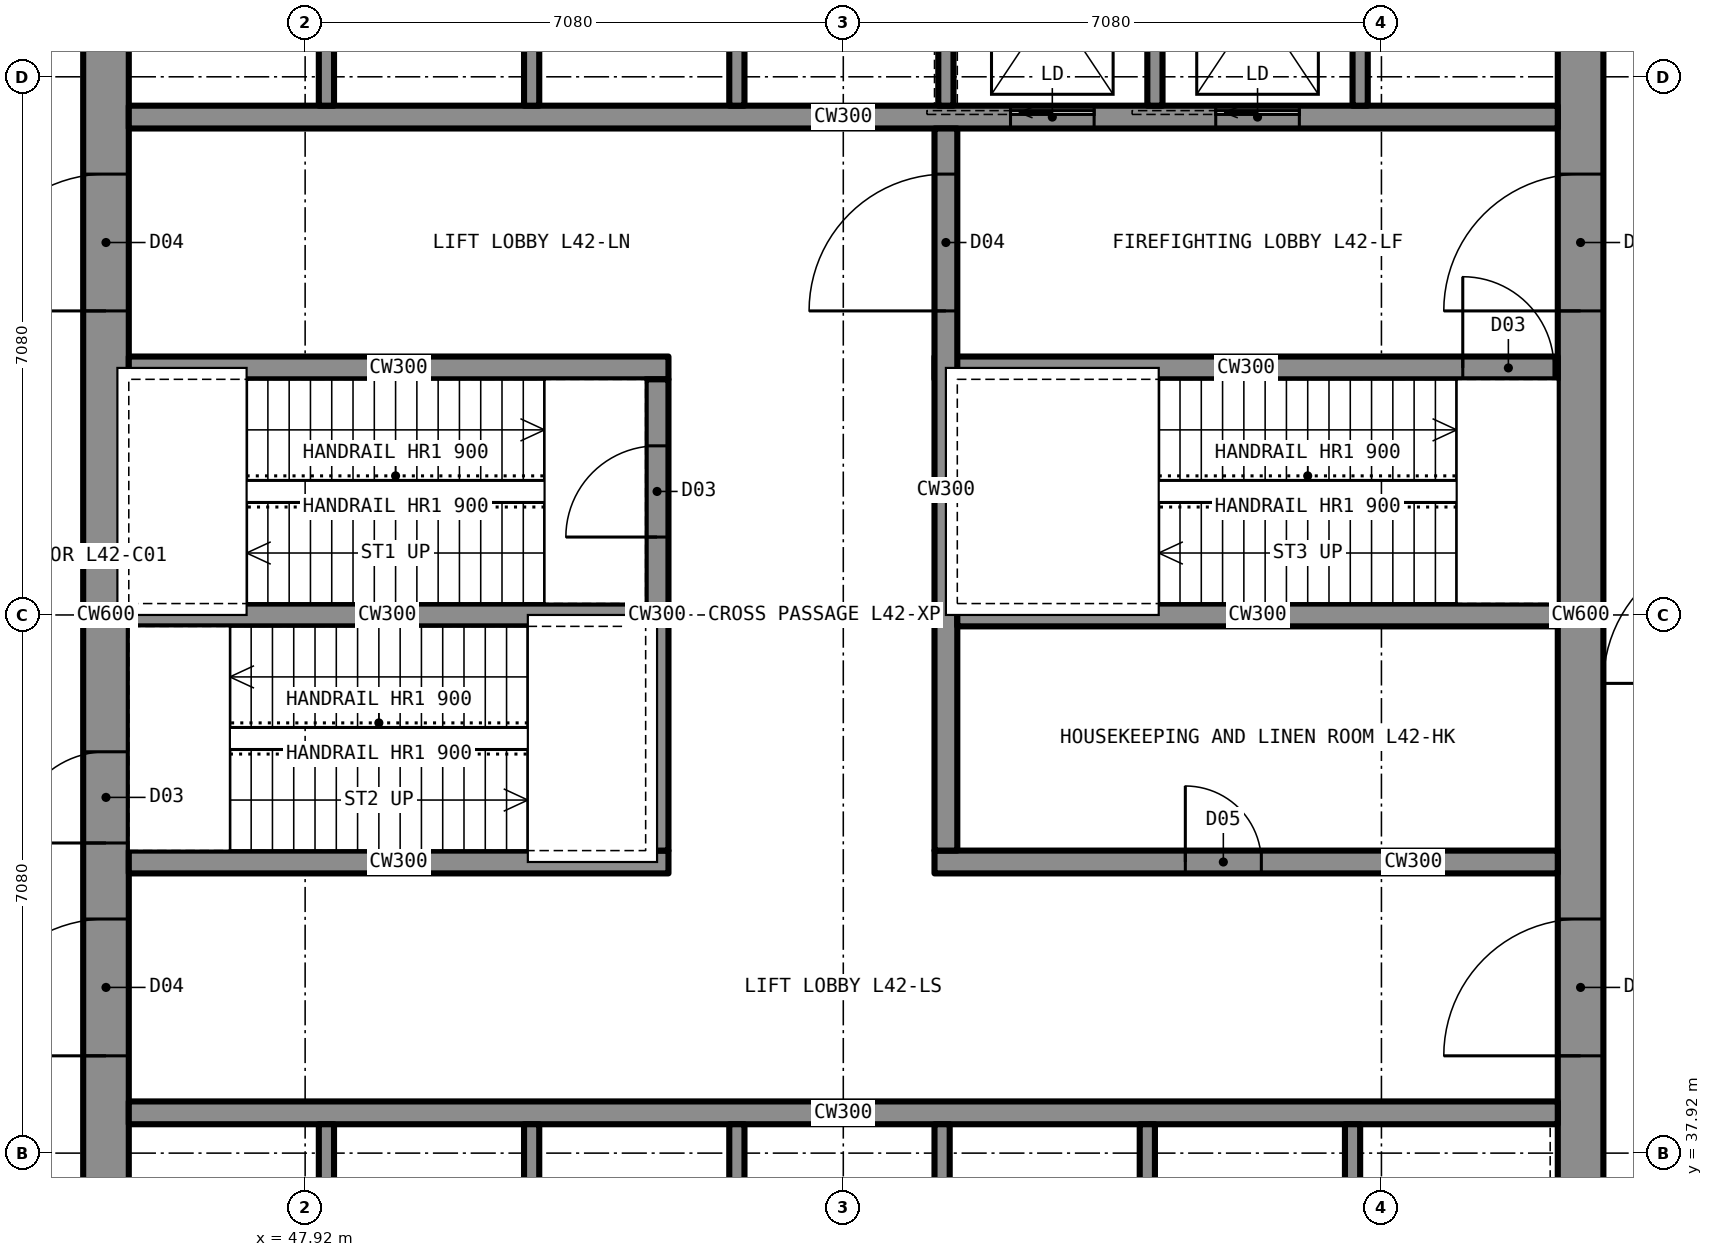
"""IFC4 building model, lengths in metres.
Left out: names, types, materials, properties, quantities, classifications, styles, units other than length and angle.
Written with IfcOpenShell. Run it as: python <this file> out.ifc"""

import sys

from ifc_helpers import new_model, si_unit, direction, frame, frame_2d, origin, place, context, subcontext, project, spatial, rectangle, extrude, element, fill, save


model = new_model("IFC4")
c1 = context("Model", 3, precision=1e-05, world=origin(), true_north=direction((0.0, 1.0)))
c2 = subcontext(c1, "Body", "Model", "MODEL_VIEW")
j1 = project(units=[si_unit("LENGTHUNIT", "METRE"), si_unit("PLANEANGLEUNIT", "RADIAN")], contexts=[c1])
p1 = place(None, origin())
s1 = spatial("IfcSite", under=j1, at=p1, CompositionType="ELEMENT")
p2 = place(p1, origin())
s2 = spatial("IfcBuilding", under=s1, at=p2, CompositionType="ELEMENT")
p3 = place(p2, frame((0.0, 0.0, 156.4)))
s3 = spatial("IfcBuildingStorey", under=s2, at=p3, CompositionType="ELEMENT", Elevation=156.4)
p4 = place(p3, frame((64.7, 35.6, 0.0), z_axis=(0.0, 0.0, 1.0), x_axis=(0.0, 1.0, 0.0)))
e1 = element("IfcWall", 1, at=p4, inside=s3, PredefinedType="SHEAR", context=c2, shape_type="SweptSolid", body=[
    extrude(rectangle(XDim=18.8, YDim=0.6, at=frame_2d((9.4, 0.0))), origin(), (0.0, 0.0, 1.0), 5.4),
])
p5 = place(p4, frame((13.4, 0.0, 0.0)))
e2 = element("IfcOpeningElement", 2, at=p5, cuts=e1, PredefinedType="OPENING", context=c2, shape_type="SweptSolid", body=[
    extrude(rectangle(XDim=1.8, YDim=2.2, at=frame_2d((0.9, 1.1))), frame((0.0, 0.31, 0.0), z_axis=(0.0, -1.0, 0.0), x_axis=(1.0, 0.0, 0.0)), (0.0, 0.0, 1.0), 0.62),
])
p6 = place(p4, frame((3.6, 0.0, 0.0)))
e3 = element("IfcOpeningElement", 3, at=p6, cuts=e1, PredefinedType="OPENING", context=c2, shape_type="SweptSolid", body=[
    extrude(rectangle(XDim=1.8, YDim=2.2, at=frame_2d((0.9, 1.1))), frame((0.0, 0.31, 0.0), z_axis=(0.0, -1.0, 0.0), x_axis=(1.0, 0.0, 0.0)), (0.0, 0.0, 1.0), 0.62),
])
p7 = place(p3, frame((45.3, 35.6, 0.0), z_axis=(0.0, 0.0, 1.0), x_axis=(0.0, 1.0, 0.0)))
e4 = element("IfcWall", 4, at=p7, inside=s3, PredefinedType="SHEAR", context=c2, shape_type="SweptSolid", body=[
    extrude(rectangle(XDim=18.8, YDim=0.6, at=frame_2d((9.4, 0.0))), origin(), (0.0, 0.0, 1.0), 5.4),
])
p8 = place(p7, frame((13.4, 0.0, 0.0)))
e5 = element("IfcOpeningElement", 5, at=p8, cuts=e4, PredefinedType="OPENING", context=c2, shape_type="SweptSolid", body=[
    extrude(rectangle(XDim=1.8, YDim=2.2, at=frame_2d((0.9, 1.1))), frame((0.0, 0.31, 0.0), z_axis=(0.0, -1.0, 0.0), x_axis=(1.0, 0.0, 0.0)), (0.0, 0.0, 1.0), 0.62),
])
p9 = place(p7, frame((3.6, 0.0, 0.0)))
e6 = element("IfcOpeningElement", 6, at=p9, cuts=e4, PredefinedType="OPENING", context=c2, shape_type="SweptSolid", body=[
    extrude(rectangle(XDim=1.8, YDim=2.2, at=frame_2d((0.9, 1.1))), frame((0.0, 0.31, 0.0), z_axis=(0.0, -1.0, 0.0), x_axis=(1.0, 0.0, 0.0)), (0.0, 0.0, 1.0), 0.62),
])
p10 = place(p7, frame((6.4, 0.0, 0.0)))
e7 = element("IfcOpeningElement", 7, at=p10, cuts=e4, PredefinedType="OPENING", context=c2, shape_type="SweptSolid", body=[
    extrude(rectangle(XDim=1.2, YDim=2.2, at=frame_2d((0.6, 1.1))), frame((0.0, 0.31, 0.0), z_axis=(0.0, -1.0, 0.0), x_axis=(1.0, 0.0, 0.0)), (0.0, 0.0, 1.0), 0.62),
])
p11 = place(p3, frame((45.6, 51.55, 0.0), z_axis=(0.0, 0.0, 1.0), x_axis=(1.0, 0.0, 0.0)))
e8 = element("IfcWall", 8, at=p11, inside=s3, PredefinedType="SHEAR", context=c2, shape_type="SweptSolid", body=[
    extrude(rectangle(XDim=18.8, YDim=0.3, at=frame_2d((9.4, 0.0))), origin(), (0.0, 0.0, 1.0), 5.4),
])
p12 = place(p11, frame((11.6, 0.0, 0.0)))
e9 = element("IfcOpeningElement", 9, at=p12, cuts=e8, PredefinedType="OPENING", context=c2, shape_type="SweptSolid", body=[
    extrude(rectangle(XDim=1.1, YDim=2.2, at=frame_2d((0.55, 1.1))), frame((0.0, 0.16, 0.0), z_axis=(0.0, -1.0, 0.0), x_axis=(1.0, 0.0, 0.0)), (0.0, 0.0, 1.0), 0.32),
])
p13 = place(p11, frame((14.3, 0.0, 0.0)))
e10 = element("IfcOpeningElement", 10, at=p13, cuts=e8, PredefinedType="OPENING", context=c2, shape_type="SweptSolid", body=[
    extrude(rectangle(XDim=1.1, YDim=2.2, at=frame_2d((0.55, 1.1))), frame((0.0, 0.16, 0.0), z_axis=(0.0, -1.0, 0.0), x_axis=(1.0, 0.0, 0.0)), (0.0, 0.0, 1.0), 0.32),
])
p14 = place(p3, frame((45.6, 38.45, 0.0), z_axis=(0.0, 0.0, 1.0), x_axis=(1.0, 0.0, 0.0)))
e11 = element("IfcWall", 11, at=p14, inside=s3, PredefinedType="SHEAR", context=c2, shape_type="SweptSolid", body=[
    extrude(rectangle(XDim=18.8, YDim=0.3, at=frame_2d((9.4, 0.0))), origin(), (0.0, 0.0, 1.0), 5.4),
])
p15 = place(p3, frame((45.6, 48.25, 0.0), z_axis=(0.0, 0.0, 1.0), x_axis=(1.0, 0.0, 0.0)))
e12 = element("IfcWall", 12, at=p15, inside=s3, PredefinedType="SHEAR", context=c2, shape_type="SweptSolid", body=[
    extrude(rectangle(XDim=7.1, YDim=0.3, at=frame_2d((3.55, 0.0))), origin(), (0.0, 0.0, 1.0), 5.4),
])
p16 = place(p3, frame((56.2, 48.25, 0.0), z_axis=(0.0, 0.0, 1.0), x_axis=(1.0, 0.0, 0.0)))
e13 = element("IfcWall", 13, at=p16, inside=s3, PredefinedType="SHEAR", context=c2, shape_type="SweptSolid", body=[
    extrude(rectangle(XDim=8.2, YDim=0.3, at=frame_2d((4.1, 0.0))), origin(), (0.0, 0.0, 1.0), 5.4),
])
p17 = place(p16, frame((6.95, 0.0, 0.0)))
e14 = element("IfcOpeningElement", 14, at=p17, cuts=e13, PredefinedType="OPENING", context=c2, shape_type="SweptSolid", body=[
    extrude(rectangle(XDim=1.2, YDim=2.2, at=frame_2d((0.6, 1.1))), frame((0.0, 0.16, 0.0), z_axis=(0.0, -1.0, 0.0), x_axis=(1.0, 0.0, 0.0)), (0.0, 0.0, 1.0), 0.32),
])
p18 = place(p3, frame((45.6, 41.75, 0.0), z_axis=(0.0, 0.0, 1.0), x_axis=(1.0, 0.0, 0.0)))
e15 = element("IfcWall", 15, at=p18, inside=s3, PredefinedType="SHEAR", context=c2, shape_type="SweptSolid", body=[
    extrude(rectangle(XDim=7.1, YDim=0.3, at=frame_2d((3.55, 0.0))), origin(), (0.0, 0.0, 1.0), 5.4),
])
p19 = place(p3, frame((56.2, 41.75, 0.0), z_axis=(0.0, 0.0, 1.0), x_axis=(1.0, 0.0, 0.0)))
e16 = element("IfcWall", 16, at=p19, inside=s3, PredefinedType="SHEAR", context=c2, shape_type="SweptSolid", body=[
    extrude(rectangle(XDim=8.2, YDim=0.3, at=frame_2d((4.1, 0.0))), origin(), (0.0, 0.0, 1.0), 5.4),
])
p20 = place(p19, frame((3.3, 0.0, 0.0)))
e17 = element("IfcOpeningElement", 17, at=p20, cuts=e16, PredefinedType="OPENING", context=c2, shape_type="SweptSolid", body=[
    extrude(rectangle(XDim=1.0, YDim=2.1, at=frame_2d((0.5, 1.05))), frame((0.0, 0.16, 0.0), z_axis=(0.0, -1.0, 0.0), x_axis=(1.0, 0.0, 0.0)), (0.0, 0.0, 1.0), 0.32),
])
p21 = place(p3, frame((52.55, 41.9, 0.0), z_axis=(0.0, 0.0, 1.0), x_axis=(0.0, 1.0, 0.0)))
e18 = element("IfcWall", 18, at=p21, inside=s3, PredefinedType="SHEAR", context=c2, shape_type="SweptSolid", body=[
    extrude(rectangle(XDim=6.2, YDim=0.3, at=frame_2d((3.1, 0.0))), origin(), (0.0, 0.0, 1.0), 5.4),
])
p22 = place(p21, frame((4.125, 0.0, 0.0)))
e19 = element("IfcOpeningElement", 19, at=p22, cuts=e18, PredefinedType="OPENING", context=c2, shape_type="SweptSolid", body=[
    extrude(rectangle(XDim=1.2, YDim=2.2, at=frame_2d((0.6, 1.1))), frame((0.0, 0.16, 0.0), z_axis=(0.0, -1.0, 0.0), x_axis=(1.0, 0.0, 0.0)), (0.0, 0.0, 1.0), 0.32),
])
p23 = place(p3, frame((56.35, 41.9, 0.0), z_axis=(0.0, 0.0, 1.0), x_axis=(0.0, 1.0, 0.0)))
e20 = element("IfcWall", 20, at=p23, inside=s3, PredefinedType="SHEAR", context=c2, shape_type="SweptSolid", body=[
    extrude(rectangle(XDim=9.5, YDim=0.3, at=frame_2d((4.75, 0.0))), origin(), (0.0, 0.0, 1.0), 5.4),
])
p24 = place(p23, frame((7.1, 0.0, 0.0)))
e21 = element("IfcOpeningElement", 21, at=p24, cuts=e20, PredefinedType="OPENING", context=c2, shape_type="SweptSolid", body=[
    extrude(rectangle(XDim=1.8, YDim=2.2, at=frame_2d((0.9, 1.1))), frame((0.0, 0.16, 0.0), z_axis=(0.0, -1.0, 0.0), x_axis=(1.0, 0.0, 0.0)), (0.0, 0.0, 1.0), 0.32),
])
p25 = place(p3, frame((45.6, 45.0, 0.0), z_axis=(0.0, 0.0, 1.0), x_axis=(1.0, 0.0, 0.0)))
e22 = element("IfcWall", 22, at=p25, inside=s3, PredefinedType="SHEAR", context=c2, shape_type="SweptSolid", body=[
    extrude(rectangle(XDim=6.8, YDim=0.3, at=frame_2d((3.4, 0.0))), origin(), (0.0, 0.0, 1.0), 5.4),
])
p26 = place(p3, frame((56.5, 45.0, 0.0), z_axis=(0.0, 0.0, 1.0), x_axis=(1.0, 0.0, 0.0)))
e23 = element("IfcWall", 23, at=p26, inside=s3, PredefinedType="SHEAR", context=c2, shape_type="SweptSolid", body=[
    extrude(rectangle(XDim=7.9, YDim=0.3, at=frame_2d((3.95, 0.0))), origin(), (0.0, 0.0, 1.0), 5.4),
])
for number, where, z_axis, x_axis in (
    (24, (48.2, 51.7, 0.0), (0.0, 0.0, 1.0), (0.0, 1.0, 0.0)),
    (25, (50.9, 51.7, 0.0), (0.0, 0.0, 1.0), (0.0, 1.0, 0.0)),
    (26, (53.6, 51.7, 0.0), (0.0, 0.0, 1.0), (0.0, 1.0, 0.0)),
    (27, (59.1, 51.7, 0.0), (0.0, 0.0, 1.0), (0.0, 1.0, 0.0)),
    (28, (61.8, 51.7, 0.0), (0.0, 0.0, 1.0), (0.0, 1.0, 0.0)),
    (29, (56.35, 51.7, 0.0), (0.0, 0.0, 1.0), (0.0, 1.0, 0.0)),
    (30, (48.2, 35.6, 0.0), (0.0, 0.0, 1.0), (0.0, 1.0, 0.0)),
    (31, (50.9, 35.6, 0.0), (0.0, 0.0, 1.0), (0.0, 1.0, 0.0)),
    (32, (53.6, 35.6, 0.0), (0.0, 0.0, 1.0), (0.0, 1.0, 0.0)),
    (33, (56.3, 35.6, 0.0), (0.0, 0.0, 1.0), (0.0, 1.0, 0.0)),
    (34, (59.0, 35.6, 0.0), (0.0, 0.0, 1.0), (0.0, 1.0, 0.0)),
    (35, (61.7, 35.6, 0.0), (0.0, 0.0, 1.0), (0.0, 1.0, 0.0)),
):
    element("IfcWall", number, at=place(p3, frame(where, z_axis=z_axis, x_axis=x_axis)), inside=s3, PredefinedType="PARTITIONING", context=c2, shape_type="SweptSolid", body=[
        extrude(rectangle(XDim=2.7, YDim=0.2, at=frame_2d((1.35, 0.0))), origin(), (0.0, 0.0, 1.0), 5.23),
    ])
p27 = place(p8, origin())
e36 = element("IfcDoor", 36, at=p27, inside=s3, OperationType="DOUBLE_DOOR_SINGLE_SWING", PredefinedType="DOOR", context=c2, shape_type="SweptSolid", body=[
    extrude(rectangle(XDim=1.8, YDim=2.2, at=frame_2d((0.9, 1.1))), frame((0.0, 0.025, 0.0), z_axis=(0.0, -1.0, 0.0), x_axis=(1.0, 0.0, 0.0)), (0.0, 0.0, 1.0), 0.05),
])
fill(e5, e36)
p28 = place(p9, origin())
e37 = element("IfcDoor", 37, at=p28, inside=s3, OperationType="DOUBLE_DOOR_SINGLE_SWING", PredefinedType="DOOR", context=c2, shape_type="SweptSolid", body=[
    extrude(rectangle(XDim=1.8, YDim=2.2, at=frame_2d((0.9, 1.1))), frame((0.0, 0.025, 0.0), z_axis=(0.0, -1.0, 0.0), x_axis=(1.0, 0.0, 0.0)), (0.0, 0.0, 1.0), 0.05),
])
fill(e6, e37)
p29 = place(p5, origin())
e38 = element("IfcDoor", 38, at=p29, inside=s3, OperationType="DOUBLE_DOOR_SINGLE_SWING", PredefinedType="DOOR", context=c2, shape_type="SweptSolid", body=[
    extrude(rectangle(XDim=1.8, YDim=2.2, at=frame_2d((0.9, 1.1))), frame((0.0, 0.025, 0.0), z_axis=(0.0, -1.0, 0.0), x_axis=(1.0, 0.0, 0.0)), (0.0, 0.0, 1.0), 0.05),
])
fill(e2, e38)
p30 = place(p6, origin())
e39 = element("IfcDoor", 39, at=p30, inside=s3, OperationType="DOUBLE_DOOR_SINGLE_SWING", PredefinedType="DOOR", context=c2, shape_type="SweptSolid", body=[
    extrude(rectangle(XDim=1.8, YDim=2.2, at=frame_2d((0.9, 1.1))), frame((0.0, 0.025, 0.0), z_axis=(0.0, -1.0, 0.0), x_axis=(1.0, 0.0, 0.0)), (0.0, 0.0, 1.0), 0.05),
])
fill(e3, e39)
p31 = place(p24, origin())
e40 = element("IfcDoor", 40, at=p31, inside=s3, OperationType="DOUBLE_DOOR_SINGLE_SWING", PredefinedType="DOOR", context=c2, shape_type="SweptSolid", body=[
    extrude(rectangle(XDim=1.8, YDim=2.2, at=frame_2d((0.9, 1.1))), frame((0.0, 0.025, 0.0), z_axis=(0.0, -1.0, 0.0), x_axis=(1.0, 0.0, 0.0)), (0.0, 0.0, 1.0), 0.05),
])
fill(e21, e40)
p32 = place(p22, origin())
e41 = element("IfcDoor", 41, at=p32, inside=s3, OperationType="SINGLE_SWING_LEFT", PredefinedType="DOOR", context=c2, shape_type="SweptSolid", body=[
    extrude(rectangle(XDim=1.2, YDim=2.2, at=frame_2d((0.6, 1.1))), frame((0.0, 0.025, 0.0), z_axis=(0.0, -1.0, 0.0), x_axis=(1.0, 0.0, 0.0)), (0.0, 0.0, 1.0), 0.05),
])
fill(e19, e41)
p33 = place(p10, origin())
e42 = element("IfcDoor", 42, at=p33, inside=s3, OperationType="SINGLE_SWING_LEFT", PredefinedType="DOOR", context=c2, shape_type="SweptSolid", body=[
    extrude(rectangle(XDim=1.2, YDim=2.2, at=frame_2d((0.6, 1.1))), frame((0.0, 0.025, 0.0), z_axis=(0.0, -1.0, 0.0), x_axis=(1.0, 0.0, 0.0)), (0.0, 0.0, 1.0), 0.05),
])
fill(e7, e42)
p34 = place(p17, origin())
e43 = element("IfcDoor", 43, at=p34, inside=s3, OperationType="SINGLE_SWING_LEFT", PredefinedType="DOOR", context=c2, shape_type="SweptSolid", body=[
    extrude(rectangle(XDim=1.2, YDim=2.2, at=frame_2d((0.6, 1.1))), frame((0.0, 0.025, 0.0), z_axis=(0.0, -1.0, 0.0), x_axis=(1.0, 0.0, 0.0)), (0.0, 0.0, 1.0), 0.05),
])
fill(e14, e43)
p35 = place(p20, origin())
e44 = element("IfcDoor", 44, at=p35, inside=s3, OperationType="SINGLE_SWING_LEFT", PredefinedType="DOOR", context=c2, shape_type="SweptSolid", body=[
    extrude(rectangle(XDim=1.0, YDim=2.1, at=frame_2d((0.5, 1.05))), frame((0.0, 0.025, 0.0), z_axis=(0.0, -1.0, 0.0), x_axis=(1.0, 0.0, 0.0)), (0.0, 0.0, 1.0), 0.05),
])
fill(e17, e44)
p36 = place(p12, origin())
e45 = element("IfcDoor", 45, at=p36, inside=s3, OperationType="SLIDING_TO_LEFT", PredefinedType="DOOR", context=c2, shape_type="SweptSolid", body=[
    extrude(rectangle(XDim=1.1, YDim=2.2, at=frame_2d((0.55, 1.1))), frame((0.0, 0.025, 0.0), z_axis=(0.0, -1.0, 0.0), x_axis=(1.0, 0.0, 0.0)), (0.0, 0.0, 1.0), 0.05),
])
fill(e9, e45)
p37 = place(p13, origin())
e46 = element("IfcDoor", 46, at=p37, inside=s3, OperationType="SLIDING_TO_LEFT", PredefinedType="DOOR", context=c2, shape_type="SweptSolid", body=[
    extrude(rectangle(XDim=1.1, YDim=2.2, at=frame_2d((0.55, 1.1))), frame((0.0, 0.025, 0.0), z_axis=(0.0, -1.0, 0.0), x_axis=(1.0, 0.0, 0.0)), (0.0, 0.0, 1.0), 0.05),
])
fill(e10, e46)
save(model, sys.argv[1])
